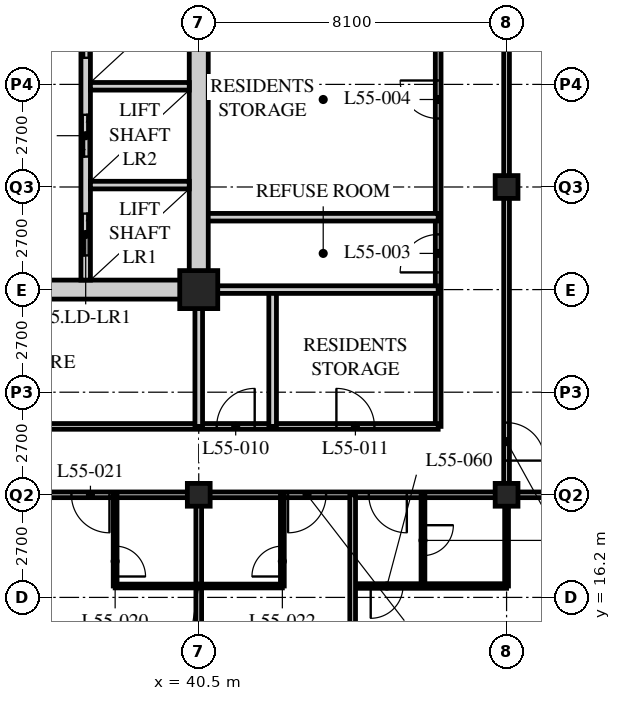
"""IFC4 building model, lengths in metres.
Left out: names, types, materials, properties, quantities, classifications, styles, units other than length and angle.
Written with IfcOpenShell. Run it as: python <this file> out.ifc"""

import sys

from ifc_helpers import new_model, si_unit, direction, frame, frame_2d, origin, origin_2d, place, context, subcontext, project, spatial, rectangle, hollow_rectangle, extrude, element, fill, save


model = new_model("IFC4")
c1 = context("Model", 3, precision=1e-05, world=origin(), true_north=direction((0.0, 1.0)))
c2 = subcontext(c1, "Body", "Model", "MODEL_VIEW")
j1 = project(units=[si_unit("LENGTHUNIT", "METRE"), si_unit("PLANEANGLEUNIT", "RADIAN")], contexts=[c1])
p1 = place(None, origin())
s1 = spatial("IfcSite", under=j1, at=p1, CompositionType="ELEMENT")
p2 = place(p1, origin())
s2 = spatial("IfcBuilding", under=s1, at=p2, CompositionType="ELEMENT")
p3 = place(p2, frame((0.0, 0.0, 213.6)))
s3 = spatial("IfcBuildingStorey", under=s2, at=p3, CompositionType="ELEMENT", Elevation=213.6)
p4 = place(p3, frame((40.5, 18.9, 0.0), z_axis=(0.0, 0.0, 1.0), x_axis=(1.0, 0.0, 0.0)))
e1 = element("IfcColumn", 1, at=p4, inside=s3, PredefinedType="COLUMN", context=c2, shape_type="SweptSolid", body=[
    extrude(hollow_rectangle(XDim=0.6, YDim=0.6, WallThickness=0.05, at=origin_2d()), origin(), (0.0, 0.0, 1.0), 3.6),
])
p5 = place(p3, frame((40.5, 24.3, 0.0), z_axis=(0.0, 0.0, 1.0), x_axis=(1.0, 0.0, 0.0)))
e2 = element("IfcColumn", 2, at=p5, inside=s3, PredefinedType="COLUMN", context=c2, shape_type="SweptSolid", body=[
    extrude(hollow_rectangle(XDim=1.0, YDim=1.0, WallThickness=0.1, at=origin_2d()), origin(), (0.0, 0.0, 1.0), 3.6),
])
for number, where, z_axis, x_axis in (
    (3, (48.6, 18.9, 0.0), (0.0, 0.0, 1.0), (1.0, 0.0, 0.0)),
    (4, (48.6, 27.0, 0.0), (0.0, 0.0, 1.0), (1.0, 0.0, 0.0)),
):
    element("IfcColumn", number, at=place(p3, frame(where, z_axis=z_axis, x_axis=x_axis)), inside=s3, PredefinedType="COLUMN", context=c2, shape_type="SweptSolid", body=[
        extrude(hollow_rectangle(XDim=0.6, YDim=0.6, WallThickness=0.05, at=origin_2d()), origin(), (0.0, 0.0, 1.0), 3.6),
    ])
p6 = place(p3, frame((12.15, 18.9, 0.0), z_axis=(0.0, 0.0, 1.0), x_axis=(1.0, 0.0, 0.0)))
e5 = element("IfcWall", 5, at=p6, inside=s3, PredefinedType="PARTITIONING", context=c2, shape_type="SweptSolid", body=[
    extrude(rectangle(XDim=36.45, YDim=0.15, at=frame_2d((18.225, 0.0))), origin(), (0.0, 0.0, 1.0), 2.778),
])
p7 = place(p6, frame((4.95, 0.0, 0.0)))
e6 = element("IfcOpeningElement", 6, at=p7, cuts=e5, PredefinedType="OPENING", context=c2, shape_type="SweptSolid", body=[
    extrude(rectangle(XDim=1.0, YDim=2.1, at=frame_2d((0.5, 1.05))), frame((0.0, 0.085, 0.0), z_axis=(0.0, -1.0, 0.0), x_axis=(1.0, 0.0, 0.0)), (0.0, 0.0, 1.0), 0.17),
])
p8 = place(p6, frame((22.6, 0.0, 0.0)))
e7 = element("IfcOpeningElement", 7, at=p8, cuts=e5, PredefinedType="OPENING", context=c2, shape_type="SweptSolid", body=[
    extrude(rectangle(XDim=1.0, YDim=2.1, at=frame_2d((0.5, 1.05))), frame((0.0, 0.085, 0.0), z_axis=(0.0, -1.0, 0.0), x_axis=(1.0, 0.0, 0.0)), (0.0, 0.0, 1.0), 0.17),
])
p9 = place(p6, frame((25.0, 0.0, 0.0)))
e8 = element("IfcOpeningElement", 8, at=p9, cuts=e5, PredefinedType="OPENING", context=c2, shape_type="SweptSolid", body=[
    extrude(rectangle(XDim=1.0, YDim=2.1, at=frame_2d((0.5, 1.05))), frame((0.0, 0.085, 0.0), z_axis=(0.0, -1.0, 0.0), x_axis=(1.0, 0.0, 0.0)), (0.0, 0.0, 1.0), 0.17),
])
p10 = place(p6, frame((30.7, 0.0, 0.0)))
e9 = element("IfcOpeningElement", 9, at=p10, cuts=e5, PredefinedType="OPENING", context=c2, shape_type="SweptSolid", body=[
    extrude(rectangle(XDim=1.0, YDim=2.1, at=frame_2d((0.5, 1.05))), frame((0.0, 0.085, 0.0), z_axis=(0.0, -1.0, 0.0), x_axis=(1.0, 0.0, 0.0)), (0.0, 0.0, 1.0), 0.17),
])
p11 = place(p6, frame((1.525, 0.0, 0.0)))
e10 = element("IfcOpeningElement", 10, at=p11, cuts=e5, PredefinedType="OPENING", context=c2, shape_type="SweptSolid", body=[
    extrude(rectangle(XDim=1.0, YDim=2.1, at=frame_2d((0.5, 1.05))), frame((0.0, 0.085, 0.0), z_axis=(0.0, -1.0, 0.0), x_axis=(1.0, 0.0, 0.0)), (0.0, 0.0, 1.0), 0.17),
])
p12 = place(p6, frame((32.825, 0.0, 0.0)))
e11 = element("IfcOpeningElement", 11, at=p12, cuts=e5, PredefinedType="OPENING", context=c2, shape_type="SweptSolid", body=[
    extrude(rectangle(XDim=1.0, YDim=2.1, at=frame_2d((0.5, 1.05))), frame((0.0, 0.085, 0.0), z_axis=(0.0, -1.0, 0.0), x_axis=(1.0, 0.0, 0.0)), (0.0, 0.0, 1.0), 0.17),
])
p13 = place(p3, frame((48.6, 18.9, 0.0), z_axis=(0.0, 0.0, 1.0), x_axis=(0.0, 1.0, 0.0)))
e12 = element("IfcWall", 12, at=p13, inside=s3, PredefinedType="PARTITIONING", context=c2, shape_type="SweptSolid", body=[
    extrude(rectangle(XDim=24.3, YDim=0.15, at=frame_2d((12.15, 0.0))), origin(), (0.0, 0.0, 1.0), 2.778),
])
p14 = place(p13, frame((0.9, 0.0, 0.0)))
e13 = element("IfcOpeningElement", 13, at=p14, cuts=e12, PredefinedType="OPENING", context=c2, shape_type="SweptSolid", body=[
    extrude(rectangle(XDim=1.0, YDim=2.1, at=frame_2d((0.5, 1.05))), frame((0.0, 0.085, 0.0), z_axis=(0.0, -1.0, 0.0), x_axis=(1.0, 0.0, 0.0)), (0.0, 0.0, 1.0), 0.17),
])
p15 = place(p13, frame((20.95, 0.0, 0.0)))
e14 = element("IfcOpeningElement", 14, at=p15, cuts=e12, PredefinedType="OPENING", context=c2, shape_type="SweptSolid", body=[
    extrude(rectangle(XDim=1.0, YDim=2.1, at=frame_2d((0.5, 1.05))), frame((0.0, 0.085, 0.0), z_axis=(0.0, -1.0, 0.0), x_axis=(1.0, 0.0, 0.0)), (0.0, 0.0, 1.0), 0.17),
])
p16 = place(p3, frame((46.8, 20.7, 0.0), z_axis=(0.0, 0.0, 1.0), x_axis=(0.0, 1.0, 0.0)))
e15 = element("IfcWall", 15, at=p16, inside=s3, PredefinedType="PARTITIONING", context=c2, shape_type="SweptSolid", body=[
    extrude(rectangle(XDim=19.8, YDim=0.15, at=frame_2d((9.9, 0.0))), origin(), (0.0, 0.0, 1.0), 3.39),
])
p17 = place(p16, frame((4.052, 0.0, 0.0)))
e16 = element("IfcOpeningElement", 16, at=p17, cuts=e15, PredefinedType="OPENING", context=c2, shape_type="SweptSolid", body=[
    extrude(rectangle(XDim=1.0, YDim=2.1, at=frame_2d((0.5, 1.05))), frame((0.0, 0.085, 0.0), z_axis=(0.0, -1.0, 0.0), x_axis=(1.0, 0.0, 0.0)), (0.0, 0.0, 1.0), 0.17),
])
p18 = place(p16, frame((8.102, 0.0, 0.0)))
e17 = element("IfcOpeningElement", 17, at=p18, cuts=e15, PredefinedType="OPENING", context=c2, shape_type="SweptSolid", body=[
    extrude(rectangle(XDim=1.0, YDim=2.1, at=frame_2d((0.5, 1.05))), frame((0.0, 0.085, 0.0), z_axis=(0.0, -1.0, 0.0), x_axis=(1.0, 0.0, 0.0)), (0.0, 0.0, 1.0), 0.17),
])
p19 = place(p16, frame((13.502, 0.0, 0.0)))
e18 = element("IfcOpeningElement", 18, at=p19, cuts=e15, PredefinedType="OPENING", context=c2, shape_type="SweptSolid", body=[
    extrude(rectangle(XDim=1.0, YDim=2.1, at=frame_2d((0.5, 1.05))), frame((0.0, 0.085, 0.0), z_axis=(0.0, -1.0, 0.0), x_axis=(1.0, 0.0, 0.0)), (0.0, 0.0, 1.0), 0.17),
])
p20 = place(p16, frame((17.552, 0.0, 0.0)))
e19 = element("IfcOpeningElement", 19, at=p20, cuts=e15, PredefinedType="OPENING", context=c2, shape_type="SweptSolid", body=[
    extrude(rectangle(XDim=1.0, YDim=2.1, at=frame_2d((0.5, 1.05))), frame((0.0, 0.085, 0.0), z_axis=(0.0, -1.0, 0.0), x_axis=(1.0, 0.0, 0.0)), (0.0, 0.0, 1.0), 0.17),
])
p21 = place(p3, frame((29.56, 20.7, 0.0), z_axis=(0.0, 0.0, 1.0), x_axis=(1.0, 0.0, 0.0)))
e20 = element("IfcWall", 20, at=p21, inside=s3, PredefinedType="PARTITIONING", context=c2, shape_type="SweptSolid", body=[
    extrude(rectangle(XDim=17.24, YDim=0.15, at=frame_2d((8.62, 0.0))), origin(), (0.0, 0.0, 1.0), 3.39),
])
p22 = place(p21, frame((4.965, 0.0, 0.0)))
e21 = element("IfcOpeningElement", 21, at=p22, cuts=e20, PredefinedType="OPENING", context=c2, shape_type="SweptSolid", body=[
    extrude(rectangle(XDim=1.0, YDim=2.1, at=frame_2d((0.5, 1.05))), frame((0.0, 0.085, 0.0), z_axis=(0.0, -1.0, 0.0), x_axis=(1.0, 0.0, 0.0)), (0.0, 0.0, 1.0), 0.17),
])
p23 = place(p21, frame((11.412, 0.0, 0.0)))
e22 = element("IfcOpeningElement", 22, at=p23, cuts=e20, PredefinedType="OPENING", context=c2, shape_type="SweptSolid", body=[
    extrude(rectangle(XDim=1.0, YDim=2.1, at=frame_2d((0.5, 1.05))), frame((0.0, 0.085, 0.0), z_axis=(0.0, -1.0, 0.0), x_axis=(1.0, 0.0, 0.0)), (0.0, 0.0, 1.0), 0.17),
])
p24 = place(p21, frame((14.562, 0.0, 0.0)))
e23 = element("IfcOpeningElement", 23, at=p24, cuts=e20, PredefinedType="OPENING", context=c2, shape_type="SweptSolid", body=[
    extrude(rectangle(XDim=1.0, YDim=2.1, at=frame_2d((0.5, 1.05))), frame((0.0, 0.085, 0.0), z_axis=(0.0, -1.0, 0.0), x_axis=(1.0, 0.0, 0.0)), (0.0, 0.0, 1.0), 0.17),
])
p25 = place(p3, frame((46.8, 26.205, 0.0), z_axis=(0.0, 0.0, 1.0), x_axis=(-1.0, 0.0, 0.0)))
e24 = element("IfcWall", 24, at=p25, inside=s3, PredefinedType="SOLIDWALL", context=c2, shape_type="SweptSolid", body=[
    extrude(rectangle(XDim=6.3, YDim=0.2, at=frame_2d((3.15, 0.0))), origin(), (0.0, 0.0, 1.0), 3.39),
])
p26 = place(p3, frame((40.5, 20.7, 0.0), z_axis=(0.0, 0.0, 1.0), x_axis=(0.0, 1.0, 0.0)))
e25 = element("IfcWall", 25, at=p26, inside=s3, PredefinedType="SOLIDWALL", context=c2, shape_type="SweptSolid", body=[
    extrude(rectangle(XDim=3.6, YDim=0.2, at=frame_2d((1.8, 0.0))), origin(), (0.0, 0.0, 1.0), 2.778),
])
p27 = place(p3, frame((42.444, 20.7, 0.0), z_axis=(0.0, 0.0, 1.0), x_axis=(0.0, 1.0, 0.0)))
e26 = element("IfcWall", 26, at=p27, inside=s3, PredefinedType="SOLIDWALL", context=c2, shape_type="SweptSolid", body=[
    extrude(rectangle(XDim=3.6, YDim=0.2, at=frame_2d((1.8, 0.0))), origin(), (0.0, 0.0, 1.0), 3.39),
])
p28 = place(p3, frame((40.5, 24.3, 0.0), z_axis=(0.0, 0.0, 1.0), x_axis=(1.0, 0.0, 0.0)))
e27 = element("IfcWall", 27, at=p28, inside=s3, PredefinedType="SOLIDWALL", context=c2, shape_type="SweptSolid", body=[
    extrude(rectangle(XDim=6.3, YDim=0.2, at=frame_2d((3.15, 0.0))), origin(), (0.0, 0.0, 1.0), 3.39),
])
p29 = place(p3, frame((38.3, 16.5, 0.0), z_axis=(0.0, 0.0, 1.0), x_axis=(1.0, 0.0, 0.0)))
e28 = element("IfcWall", 28, at=p29, inside=s3, PredefinedType="PARTITIONING", context=c2, shape_type="SweptSolid", body=[
    extrude(rectangle(XDim=4.4, YDim=0.1, at=frame_2d((2.2, 0.0))), origin(), (0.0, 0.0, 1.0), 3.39),
])
p30 = place(p3, frame((38.3, 18.9, 0.0), z_axis=(0.0, 0.0, 1.0), x_axis=(0.0, -1.0, 0.0)))
e29 = element("IfcWall", 29, at=p30, inside=s3, PredefinedType="PARTITIONING", context=c2, shape_type="SweptSolid", body=[
    extrude(rectangle(XDim=2.4, YDim=0.1, at=frame_2d((1.2, 0.0))), origin(), (0.0, 0.0, 1.0), 3.39),
])
p31 = place(p30, frame((1.35, 0.0, 0.0)))
e30 = element("IfcOpeningElement", 30, at=p31, cuts=e29, PredefinedType="OPENING", context=c2, shape_type="SweptSolid", body=[
    extrude(rectangle(XDim=0.8, YDim=2.1, at=frame_2d((0.4, 1.05))), frame((0.0, 0.06, 0.0), z_axis=(0.0, -1.0, 0.0), x_axis=(1.0, 0.0, 0.0)), (0.0, 0.0, 1.0), 0.12),
])
p32 = place(p3, frame((40.5, 18.9, 0.0), z_axis=(0.0, 0.0, 1.0), x_axis=(0.0, -1.0, 0.0)))
e31 = element("IfcWall", 31, at=p32, inside=s3, PredefinedType="PARTITIONING", context=c2, shape_type="SweptSolid", body=[
    extrude(rectangle(XDim=7.8, YDim=0.15, at=frame_2d((3.9, 0.0))), origin(), (0.0, 0.0, 1.0), 2.778),
])
p33 = place(p3, frame((42.7, 18.9, 0.0), z_axis=(0.0, 0.0, 1.0), x_axis=(0.0, -1.0, 0.0)))
e32 = element("IfcWall", 32, at=p33, inside=s3, PredefinedType="PARTITIONING", context=c2, shape_type="SweptSolid", body=[
    extrude(rectangle(XDim=2.4, YDim=0.1, at=frame_2d((1.2, 0.0))), origin(), (0.0, 0.0, 1.0), 3.39),
])
p34 = place(p33, frame((1.35, 0.0, 0.0)))
e33 = element("IfcOpeningElement", 33, at=p34, cuts=e32, PredefinedType="OPENING", context=c2, shape_type="SweptSolid", body=[
    extrude(rectangle(XDim=0.8, YDim=2.1, at=frame_2d((0.4, 1.05))), frame((0.0, 0.06, 0.0), z_axis=(0.0, -1.0, 0.0), x_axis=(1.0, 0.0, 0.0)), (0.0, 0.0, 1.0), 0.12),
])
p35 = place(p3, frame((44.55, 16.5, 0.0), z_axis=(0.0, 0.0, 1.0), x_axis=(1.0, 0.0, 0.0)))
e34 = element("IfcWall", 34, at=p35, inside=s3, PredefinedType="PARTITIONING", context=c2, shape_type="SweptSolid", body=[
    extrude(rectangle(XDim=4.05, YDim=0.12, at=frame_2d((2.025, 0.0))), origin(), (0.0, 0.0, 1.0), 3.39),
])
p36 = place(p35, frame((0.475, 0.0, 0.0)))
e35 = element("IfcOpeningElement", 35, at=p36, cuts=e34, PredefinedType="OPENING", context=c2, shape_type="SweptSolid", body=[
    extrude(rectangle(XDim=0.85, YDim=2.1, at=frame_2d((0.425, 1.05))), frame((0.0, 0.07, 0.0), z_axis=(0.0, -1.0, 0.0), x_axis=(1.0, 0.0, 0.0)), (0.0, 0.0, 1.0), 0.14),
])
p37 = place(p3, frame((46.4, 18.9, 0.0), z_axis=(0.0, 0.0, 1.0), x_axis=(0.0, -1.0, 0.0)))
e36 = element("IfcWall", 36, at=p37, inside=s3, PredefinedType="PARTITIONING", context=c2, shape_type="SweptSolid", body=[
    extrude(rectangle(XDim=2.4, YDim=0.1, at=frame_2d((1.2, 0.0))), origin(), (0.0, 0.0, 1.0), 3.39),
])
p38 = place(p37, frame((0.8, 0.0, 0.0)))
e37 = element("IfcOpeningElement", 37, at=p38, cuts=e36, PredefinedType="OPENING", context=c2, shape_type="SweptSolid", body=[
    extrude(rectangle(XDim=0.8, YDim=2.1, at=frame_2d((0.4, 1.05))), frame((0.0, 0.06, 0.0), z_axis=(0.0, -1.0, 0.0), x_axis=(1.0, 0.0, 0.0)), (0.0, 0.0, 1.0), 0.12),
])
p39 = place(p3, frame((48.6, 18.9, 0.0), z_axis=(0.0, 0.0, 1.0), x_axis=(0.0, -1.0, 0.0)))
e38 = element("IfcWall", 38, at=p39, inside=s3, PredefinedType="PARTITIONING", context=c2, shape_type="SweptSolid", body=[
    extrude(rectangle(XDim=2.4, YDim=0.1, at=frame_2d((1.2, 0.0))), origin(), (0.0, 0.0, 1.0), 2.778),
])
p40 = place(p3, frame((48.6, 18.9, 0.0), z_axis=(0.0, 0.0, 1.0), x_axis=(1.0, 0.0, 0.0)))
e39 = element("IfcWall", 39, at=p40, inside=s3, PredefinedType="PARTITIONING", context=c2, shape_type="SweptSolid", body=[
    extrude(rectangle(XDim=3.75, YDim=0.15, at=frame_2d((1.875, 0.0))), origin(), (0.0, 0.0, 1.0), 2.778),
])
p41 = place(p3, frame((44.55, 18.9, 0.0), z_axis=(0.0, 0.0, 1.0), x_axis=(0.0, -1.0, 0.0)))
e40 = element("IfcWall", 40, at=p41, inside=s3, PredefinedType="PARTITIONING", context=c2, shape_type="SweptSolid", body=[
    extrude(rectangle(XDim=7.8, YDim=0.15, at=frame_2d((3.9, 0.0))), origin(), (0.0, 0.0, 1.0), 3.39),
])
p42 = place(p3, frame((15.95, 24.3, 0.0), z_axis=(0.0, 0.0, 1.0), x_axis=(1.0, 0.0, 0.0)))
e41 = element("IfcWall", 41, at=p42, inside=s3, PredefinedType="SOLIDWALL", context=c2, shape_type="SweptSolid", body=[
    extrude(rectangle(XDim=24.8, YDim=0.5, at=frame_2d((12.4, 0.0))), origin(), (0.0, 0.0, 1.0), 2.74),
])
p43 = place(p42, frame((11.5, 0.0, 0.0)))
e42 = element("IfcOpeningElement", 42, at=p43, cuts=e41, PredefinedType="OPENING", context=c2, shape_type="SweptSolid", body=[
    extrude(rectangle(XDim=1.8, YDim=2.4, at=frame_2d((0.9, 1.2))), frame((0.0, 0.26, 0.0), z_axis=(0.0, -1.0, 0.0), x_axis=(1.0, 0.0, 0.0)), (0.0, 0.0, 1.0), 0.52),
])
p44 = place(p3, frame((40.5, 24.55, 0.0), z_axis=(0.0, 0.0, 1.0), x_axis=(0.0, 1.0, 0.0)))
e43 = element("IfcWall", 43, at=p44, inside=s3, PredefinedType="SOLIDWALL", context=c2, shape_type="SweptSolid", body=[
    extrude(rectangle(XDim=15.7, YDim=0.5, at=frame_2d((7.85, 0.0))), origin(), (0.0, 0.0, 1.0), 2.778),
])
p45 = place(p3, frame((37.525, 24.55, 0.0), z_axis=(0.0, 0.0, 1.0), x_axis=(0.0, 1.0, 0.0)))
e44 = element("IfcWall", 44, at=p45, inside=s3, PredefinedType="SOLIDWALL", context=c2, shape_type="SweptSolid", body=[
    extrude(rectangle(XDim=7.75, YDim=0.25, at=frame_2d((3.875, 0.0))), origin(), (0.0, 0.0, 1.0), 3.39),
])
p46 = place(p45, frame((0.65, 0.0, 0.0)))
e45 = element("IfcOpeningElement", 45, at=p46, cuts=e44, PredefinedType="OPENING", context=c2, shape_type="SweptSolid", body=[
    extrude(rectangle(XDim=1.1, YDim=2.4, at=frame_2d((0.55, 1.2))), frame((0.0, 0.135, 0.0), z_axis=(0.0, -1.0, 0.0), x_axis=(1.0, 0.0, 0.0)), (0.0, 0.0, 1.0), 0.27),
])
p47 = place(p45, frame((3.25, 0.0, 0.0)))
e46 = element("IfcOpeningElement", 46, at=p47, cuts=e44, PredefinedType="OPENING", context=c2, shape_type="SweptSolid", body=[
    extrude(rectangle(XDim=1.1, YDim=2.4, at=frame_2d((0.55, 1.2))), frame((0.0, 0.135, 0.0), z_axis=(0.0, -1.0, 0.0), x_axis=(1.0, 0.0, 0.0)), (0.0, 0.0, 1.0), 0.27),
])
p48 = place(p45, frame((5.85, 0.0, 0.0)))
e47 = element("IfcOpeningElement", 47, at=p48, cuts=e44, PredefinedType="OPENING", context=c2, shape_type="SweptSolid", body=[
    extrude(rectangle(XDim=1.1, YDim=2.4, at=frame_2d((0.55, 1.2))), frame((0.0, 0.135, 0.0), z_axis=(0.0, -1.0, 0.0), x_axis=(1.0, 0.0, 0.0)), (0.0, 0.0, 1.0), 0.27),
])
for number, where, z_axis, x_axis in (
    (48, (37.65, 27.05, 0.0), (0.0, 0.0, 1.0), (1.0, 0.0, 0.0)),
    (49, (37.65, 29.65, 0.0), (0.0, 0.0, 1.0), (1.0, 0.0, 0.0)),
):
    element("IfcWall", number, at=place(p3, frame(where, z_axis=z_axis, x_axis=x_axis)), inside=s3, PredefinedType="SOLIDWALL", context=c2, shape_type="SweptSolid", body=[
        extrude(rectangle(XDim=2.6, YDim=0.2, at=frame_2d((1.3, 0.0))), origin(), (0.0, 0.0, 1.0), 3.39),
    ])
p49 = place(p17, origin())
e50 = element("IfcDoor", 50, at=p49, inside=s3, OperationType="SINGLE_SWING_LEFT", PredefinedType="DOOR", context=c2, shape_type="SweptSolid", body=[
    extrude(rectangle(XDim=1.0, YDim=2.1, at=frame_2d((0.5, 1.05))), frame((0.0, 0.025, 0.0), z_axis=(0.0, -1.0, 0.0), x_axis=(1.0, 0.0, 0.0)), (0.0, 0.0, 1.0), 0.05),
])
fill(e16, e50)
p50 = place(p18, origin())
e51 = element("IfcDoor", 51, at=p50, inside=s3, OperationType="SINGLE_SWING_RIGHT", PredefinedType="DOOR", context=c2, shape_type="SweptSolid", body=[
    extrude(rectangle(XDim=1.0, YDim=2.1, at=frame_2d((0.5, 1.05))), frame((0.0, 0.025, 0.0), z_axis=(0.0, -1.0, 0.0), x_axis=(1.0, 0.0, 0.0)), (0.0, 0.0, 1.0), 0.05),
])
fill(e17, e51)
p51 = place(p23, origin())
e52 = element("IfcDoor", 52, at=p51, inside=s3, OperationType="SINGLE_SWING_RIGHT", PredefinedType="DOOR", context=c2, shape_type="SweptSolid", body=[
    extrude(rectangle(XDim=1.0, YDim=2.1, at=frame_2d((0.5, 1.05))), frame((0.0, 0.025, 0.0), z_axis=(0.0, -1.0, 0.0), x_axis=(1.0, 0.0, 0.0)), (0.0, 0.0, 1.0), 0.05),
])
fill(e22, e52)
p52 = place(p24, origin())
e53 = element("IfcDoor", 53, at=p52, inside=s3, OperationType="SINGLE_SWING_LEFT", PredefinedType="DOOR", context=c2, shape_type="SweptSolid", body=[
    extrude(rectangle(XDim=1.0, YDim=2.1, at=frame_2d((0.5, 1.05))), frame((0.0, 0.025, 0.0), z_axis=(0.0, -1.0, 0.0), x_axis=(1.0, 0.0, 0.0)), (0.0, 0.0, 1.0), 0.05),
])
fill(e23, e53)
p53 = place(p31, origin())
e54 = element("IfcDoor", 54, at=p53, inside=s3, OperationType="SINGLE_SWING_RIGHT", PredefinedType="DOOR", context=c2, shape_type="SweptSolid", body=[
    extrude(rectangle(XDim=0.8, YDim=2.1, at=frame_2d((0.4, 1.05))), frame((0.0, 0.025, 0.0), z_axis=(0.0, -1.0, 0.0), x_axis=(1.0, 0.0, 0.0)), (0.0, 0.0, 1.0), 0.05),
])
fill(e30, e54)
p54 = place(p9, origin())
e55 = element("IfcDoor", 55, at=p54, inside=s3, OperationType="SINGLE_SWING_LEFT", PredefinedType="DOOR", context=c2, shape_type="SweptSolid", body=[
    extrude(rectangle(XDim=1.0, YDim=2.1, at=frame_2d((0.5, 1.05))), frame((0.0, 0.025, 0.0), z_axis=(0.0, -1.0, 0.0), x_axis=(1.0, 0.0, 0.0)), (0.0, 0.0, 1.0), 0.05),
])
fill(e8, e55)
p55 = place(p34, origin())
e56 = element("IfcDoor", 56, at=p55, inside=s3, OperationType="SINGLE_SWING_LEFT", PredefinedType="DOOR", context=c2, shape_type="SweptSolid", body=[
    extrude(rectangle(XDim=0.8, YDim=2.1, at=frame_2d((0.4, 1.05))), frame((0.0, 0.025, 0.0), z_axis=(0.0, -1.0, 0.0), x_axis=(1.0, 0.0, 0.0)), (0.0, 0.0, 1.0), 0.05),
])
fill(e33, e56)
p56 = place(p10, origin())
e57 = element("IfcDoor", 57, at=p56, inside=s3, OperationType="SINGLE_SWING_RIGHT", PredefinedType="DOOR", context=c2, shape_type="SweptSolid", body=[
    extrude(rectangle(XDim=1.0, YDim=2.1, at=frame_2d((0.5, 1.05))), frame((0.0, 0.025, 0.0), z_axis=(0.0, -1.0, 0.0), x_axis=(1.0, 0.0, 0.0)), (0.0, 0.0, 1.0), 0.05),
])
fill(e9, e57)
p57 = place(p14, origin())
e58 = element("IfcDoor", 58, at=p57, inside=s3, OperationType="SINGLE_SWING_RIGHT", PredefinedType="DOOR", context=c2, shape_type="SweptSolid", body=[
    extrude(rectangle(XDim=1.0, YDim=2.1, at=frame_2d((0.5, 1.05))), frame((0.0, 0.025, 0.0), z_axis=(0.0, -1.0, 0.0), x_axis=(1.0, 0.0, 0.0)), (0.0, 0.0, 1.0), 0.05),
])
fill(e13, e58)
p58 = place(p38, origin())
e59 = element("IfcDoor", 59, at=p58, inside=s3, OperationType="SINGLE_SWING_LEFT", PredefinedType="DOOR", context=c2, shape_type="SweptSolid", body=[
    extrude(rectangle(XDim=0.8, YDim=2.1, at=frame_2d((0.4, 1.05))), frame((0.0, 0.025, 0.0), z_axis=(0.0, -1.0, 0.0), x_axis=(1.0, 0.0, 0.0)), (0.0, 0.0, 1.0), 0.05),
])
fill(e37, e59)
p59 = place(p12, origin())
e60 = element("IfcDoor", 60, at=p59, inside=s3, OperationType="SINGLE_SWING_LEFT", PredefinedType="DOOR", context=c2, shape_type="SweptSolid", body=[
    extrude(rectangle(XDim=1.0, YDim=2.1, at=frame_2d((0.5, 1.05))), frame((0.0, 0.025, 0.0), z_axis=(0.0, -1.0, 0.0), x_axis=(1.0, 0.0, 0.0)), (0.0, 0.0, 1.0), 0.05),
])
fill(e11, e60)
p60 = place(p36, origin())
e61 = element("IfcDoor", 61, at=p60, inside=s3, OperationType="SINGLE_SWING_RIGHT", PredefinedType="DOOR", context=c2, shape_type="SweptSolid", body=[
    extrude(rectangle(XDim=0.85, YDim=2.1, at=frame_2d((0.425, 1.05))), frame((0.0, 0.025, 0.0), z_axis=(0.0, -1.0, 0.0), x_axis=(1.0, 0.0, 0.0)), (0.0, 0.0, 1.0), 0.05),
])
fill(e35, e61)
p61 = place(p46, origin())
e62 = element("IfcDoor", 62, at=p61, inside=s3, OperationType="DOUBLE_DOOR_SLIDING", PredefinedType="DOOR", context=c2, shape_type="SweptSolid", body=[
    extrude(rectangle(XDim=1.1, YDim=2.4, at=frame_2d((0.55, 1.2))), frame((0.0, 0.025, 0.0), z_axis=(0.0, -1.0, 0.0), x_axis=(1.0, 0.0, 0.0)), (0.0, 0.0, 1.0), 0.05),
])
fill(e45, e62)
p62 = place(p47, origin())
e63 = element("IfcDoor", 63, at=p62, inside=s3, OperationType="DOUBLE_DOOR_SLIDING", PredefinedType="DOOR", context=c2, shape_type="SweptSolid", body=[
    extrude(rectangle(XDim=1.1, YDim=2.4, at=frame_2d((0.55, 1.2))), frame((0.0, 0.025, 0.0), z_axis=(0.0, -1.0, 0.0), x_axis=(1.0, 0.0, 0.0)), (0.0, 0.0, 1.0), 0.05),
])
fill(e46, e63)
p63 = place(p48, origin())
e64 = element("IfcDoor", 64, at=p63, inside=s3, OperationType="DOUBLE_DOOR_SLIDING", PredefinedType="DOOR", context=c2, shape_type="SweptSolid", body=[
    extrude(rectangle(XDim=1.1, YDim=2.4, at=frame_2d((0.55, 1.2))), frame((0.0, 0.025, 0.0), z_axis=(0.0, -1.0, 0.0), x_axis=(1.0, 0.0, 0.0)), (0.0, 0.0, 1.0), 0.05),
])
fill(e47, e64)
save(model, sys.argv[1])
